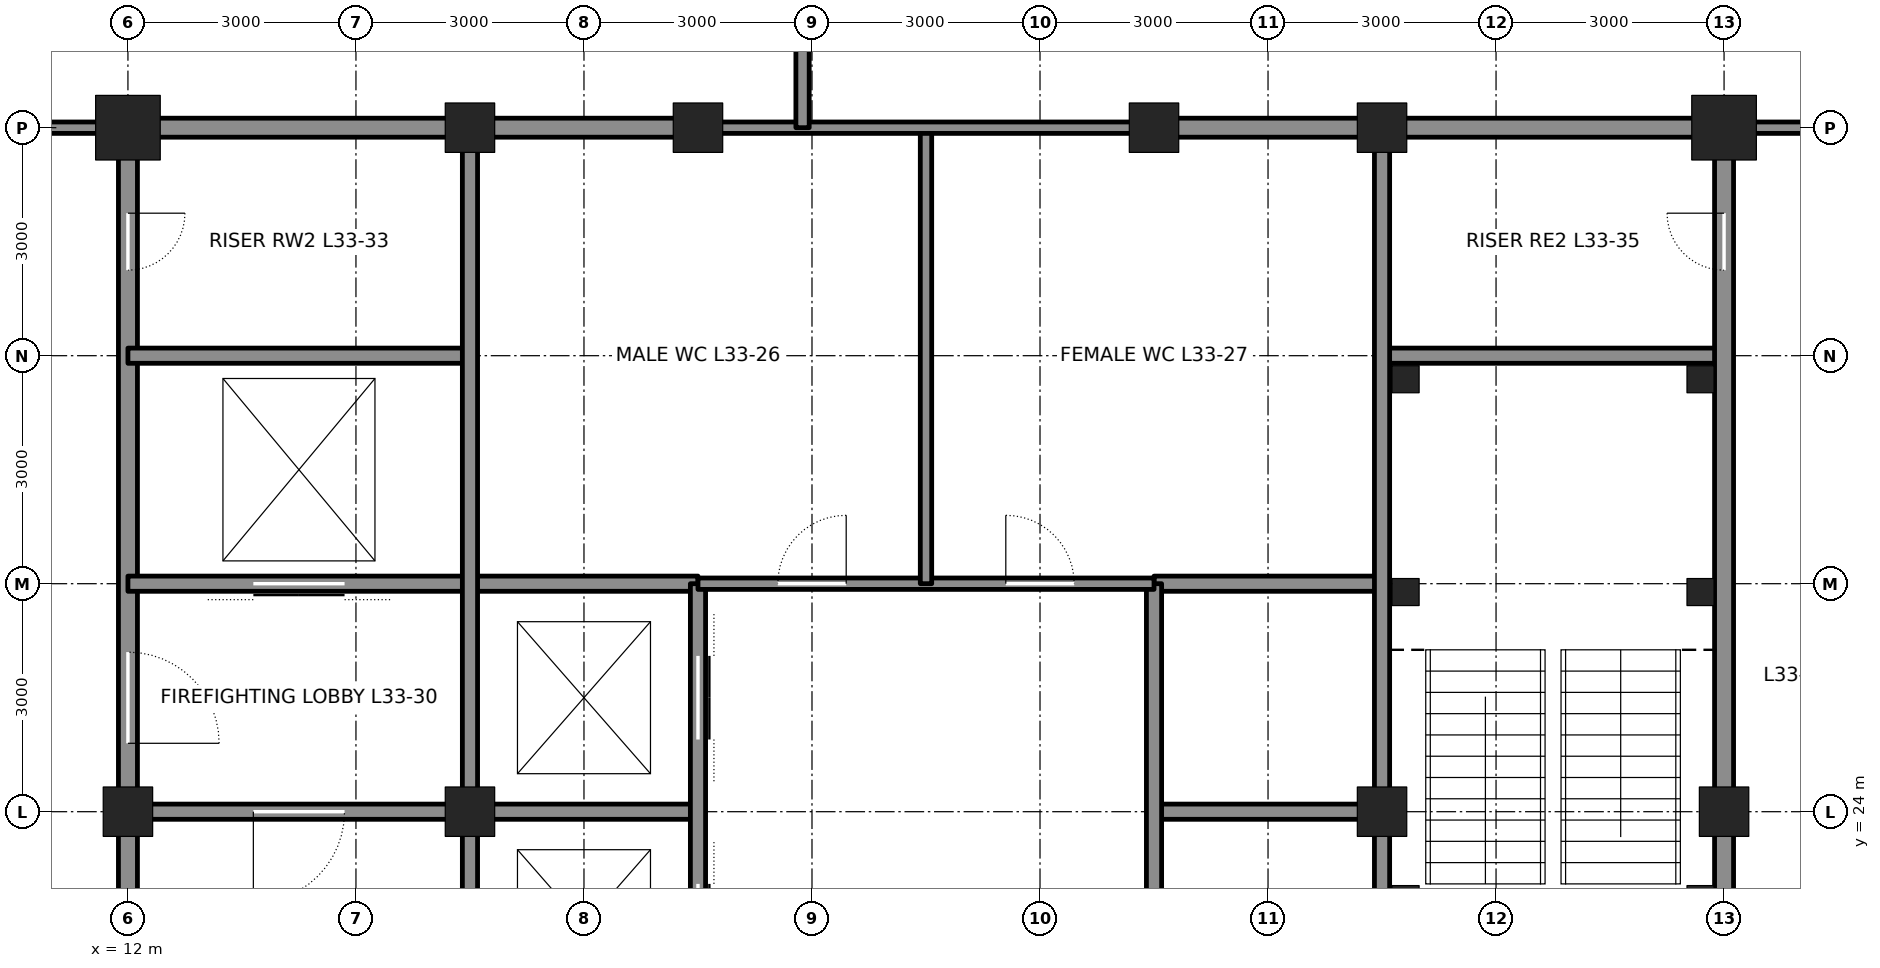
"""IFC4 building model, lengths in metres.
Left out: names, types, materials, properties, quantities, classifications, styles, units other than length and angle.
Written with IfcOpenShell. Run it as: python <this file> out.ifc"""

import sys

from ifc_helpers import new_model, si_unit, direction, frame, frame_2d, origin, origin_2d, place, context, subcontext, project, spatial, rectangle, hollow_rectangle, extrude, element, fill, save


model = new_model("IFC4")
c1 = context("Model", 3, precision=1e-05, world=origin(), true_north=direction((0.0, 1.0)))
c2 = subcontext(c1, "Body", "Model", "MODEL_VIEW")
j1 = project(units=[si_unit("LENGTHUNIT", "METRE"), si_unit("PLANEANGLEUNIT", "RADIAN")], contexts=[c1])
p1 = place(None, origin())
s1 = spatial("IfcSite", under=j1, at=p1, CompositionType="ELEMENT")
p2 = place(p1, origin())
s2 = spatial("IfcBuilding", under=s1, at=p2, CompositionType="ELEMENT")
p3 = place(p2, frame((0.0, 0.0, 153.0)))
s3 = spatial("IfcBuildingStorey", under=s2, at=p3, CompositionType="ELEMENT", Elevation=153.0)
p4 = place(p3, frame((12.0, 33.0, 0.0), z_axis=(0.0, 0.0, 1.0), x_axis=(1.0, 0.0, 0.0)))
e1 = element("IfcColumn", 1, at=p4, inside=s3, PredefinedType="COLUMN", context=c2, shape_type="SweptSolid", body=[
    extrude(hollow_rectangle(XDim=0.85, YDim=0.85, WallThickness=0.085, at=origin_2d()), origin(), (0.0, 0.0, 1.0), 4.2),
])
for number, where, z_axis, x_axis in (
    (2, (16.5, 33.0, 0.0), (0.0, 0.0, 1.0), (1.0, 0.0, 0.0)),
    (3, (19.5, 33.0, 0.0), (0.0, 0.0, 1.0), (1.0, 0.0, 0.0)),
    (4, (25.5, 33.0, 0.0), (0.0, 0.0, 1.0), (1.0, 0.0, 0.0)),
    (5, (28.5, 33.0, 0.0), (0.0, 0.0, 1.0), (1.0, 0.0, 0.0)),
):
    element("IfcColumn", number, at=place(p3, frame(where, z_axis=z_axis, x_axis=x_axis)), inside=s3, PredefinedType="COLUMN", context=c2, shape_type="SweptSolid", body=[
        extrude(hollow_rectangle(XDim=0.65, YDim=0.65, WallThickness=0.065, at=origin_2d()), origin(), (0.0, 0.0, 1.0), 4.2),
    ])
p5 = place(p3, frame((33.0, 33.0, 0.0), z_axis=(0.0, 0.0, 1.0), x_axis=(1.0, 0.0, 0.0)))
e6 = element("IfcColumn", 6, at=p5, inside=s3, PredefinedType="COLUMN", context=c2, shape_type="SweptSolid", body=[
    extrude(hollow_rectangle(XDim=0.85, YDim=0.85, WallThickness=0.085, at=origin_2d()), origin(), (0.0, 0.0, 1.0), 4.2),
])
for number, where, z_axis, x_axis in (
    (7, (12.0, 24.0, 0.0), (0.0, 0.0, 1.0), (1.0, 0.0, 0.0)),
    (8, (33.0, 24.0, 0.0), (0.0, 0.0, 1.0), (1.0, 0.0, 0.0)),
    (9, (16.5, 24.0, 0.0), (0.0, 0.0, 1.0), (1.0, 0.0, 0.0)),
    (10, (28.5, 24.0, 0.0), (0.0, 0.0, 1.0), (1.0, 0.0, 0.0)),
):
    element("IfcColumn", number, at=place(p3, frame(where, z_axis=z_axis, x_axis=x_axis)), inside=s3, PredefinedType="COLUMN", context=c2, shape_type="SweptSolid", body=[
        extrude(hollow_rectangle(XDim=0.65, YDim=0.65, WallThickness=0.065, at=origin_2d()), origin(), (0.0, 0.0, 1.0), 4.2),
    ])
p6 = place(p3, frame((12.0, 21.25, 0.0), z_axis=(0.0, 0.0, 1.0), x_axis=(0.0, 1.0, 0.0)))
e11 = element("IfcWall", 11, at=p6, inside=s3, PredefinedType="SOLIDWALL", context=c2, shape_type="SweptSolid", body=[
    extrude(rectangle(XDim=2.5, YDim=0.25, at=frame_2d((1.25, 0.0))), origin(), (0.0, 0.0, 1.0), 3.113),
])
p7 = place(p3, frame((12.0, 24.25, 0.0), z_axis=(0.0, 0.0, 1.0), x_axis=(0.0, 1.0, 0.0)))
e12 = element("IfcWall", 12, at=p7, inside=s3, PredefinedType="SOLIDWALL", context=c2, shape_type="SweptSolid", body=[
    extrude(rectangle(XDim=8.5, YDim=0.25, at=frame_2d((4.25, 0.0))), origin(), (0.0, 0.0, 1.0), 3.113),
])
p8 = place(p7, frame((0.65, 0.0, 0.0)))
e13 = element("IfcOpeningElement", 13, at=p8, cuts=e12, PredefinedType="OPENING", context=c2, shape_type="SweptSolid", body=[
    extrude(rectangle(XDim=1.2, YDim=2.1, at=frame_2d((0.6, 1.05))), frame((0.0, 0.135, 0.0), z_axis=(0.0, -1.0, 0.0), x_axis=(1.0, 0.0, 0.0)), (0.0, 0.0, 1.0), 0.27),
])
p9 = place(p7, frame((6.875, 0.0, 0.0)))
e14 = element("IfcOpeningElement", 14, at=p9, cuts=e12, PredefinedType="OPENING", context=c2, shape_type="SweptSolid", body=[
    extrude(rectangle(XDim=0.75, YDim=2.1, at=frame_2d((0.375, 1.05))), frame((0.0, 0.135, 0.0), z_axis=(0.0, -1.0, 0.0), x_axis=(1.0, 0.0, 0.0)), (0.0, 0.0, 1.0), 0.27),
])
p10 = place(p3, frame((12.25, 24.0, 0.0), z_axis=(0.0, 0.0, 1.0), x_axis=(1.0, 0.0, 0.0)))
e15 = element("IfcWall", 15, at=p10, inside=s3, PredefinedType="SOLIDWALL", context=c2, shape_type="SweptSolid", body=[
    extrude(rectangle(XDim=4.0, YDim=0.2, at=frame_2d((2.0, 0.0))), origin(), (0.0, 0.0, 1.0), 3.09),
])
p11 = place(p10, frame((1.4, 0.0, 0.0)))
e16 = element("IfcOpeningElement", 16, at=p11, cuts=e15, PredefinedType="OPENING", context=c2, shape_type="SweptSolid", body=[
    extrude(rectangle(XDim=1.2, YDim=2.1, at=frame_2d((0.6, 1.05))), frame((0.0, 0.11, 0.0), z_axis=(0.0, -1.0, 0.0), x_axis=(1.0, 0.0, 0.0)), (0.0, 0.0, 1.0), 0.22),
])
for number, where, z_axis, x_axis in (
    (17, (16.75, 24.0, 0.0), (0.0, 0.0, 1.0), (1.0, 0.0, 0.0)),
    (18, (25.5, 24.0, 0.0), (0.0, 0.0, 1.0), (1.0, 0.0, 0.0)),
):
    element("IfcWall", number, at=place(p3, frame(where, z_axis=z_axis, x_axis=x_axis)), inside=s3, PredefinedType="SOLIDWALL", context=c2, shape_type="SweptSolid", body=[
        extrude(rectangle(XDim=2.75, YDim=0.2, at=frame_2d((1.375, 0.0))), origin(), (0.0, 0.0, 1.0), 3.09),
    ])
p12 = place(p3, frame((12.0, 27.0, 0.0), z_axis=(0.0, 0.0, 1.0), x_axis=(1.0, 0.0, 0.0)))
e19 = element("IfcWall", 19, at=p12, inside=s3, PredefinedType="SOLIDWALL", context=c2, shape_type="SweptSolid", body=[
    extrude(rectangle(XDim=7.5, YDim=0.2, at=frame_2d((3.75, 0.0))), origin(), (0.0, 0.0, 1.0), 4.04),
])
p13 = place(p12, frame((1.65, 0.0, 0.0)))
e20 = element("IfcOpeningElement", 20, at=p13, cuts=e19, PredefinedType="OPENING", context=c2, shape_type="SweptSolid", body=[
    extrude(rectangle(XDim=1.2, YDim=2.1, at=frame_2d((0.6, 1.05))), frame((0.0, 0.11, 0.0), z_axis=(0.0, -1.0, 0.0), x_axis=(1.0, 0.0, 0.0)), (0.0, 0.0, 1.0), 0.22),
])
p14 = place(p3, frame((25.5, 27.0, 0.0), z_axis=(0.0, 0.0, 1.0), x_axis=(1.0, 0.0, 0.0)))
e21 = element("IfcWall", 21, at=p14, inside=s3, PredefinedType="SOLIDWALL", context=c2, shape_type="SweptSolid", body=[
    extrude(rectangle(XDim=3.0, YDim=0.2, at=frame_2d((1.5, 0.0))), origin(), (0.0, 0.0, 1.0), 4.04),
])
for number, where, z_axis, x_axis in (
    (22, (12.0, 30.0, 0.0), (0.0, 0.0, 1.0), (1.0, 0.0, 0.0)),
    (23, (28.5, 30.0, 0.0), (0.0, 0.0, 1.0), (1.0, 0.0, 0.0)),
):
    element("IfcWall", number, at=place(p3, frame(where, z_axis=z_axis, x_axis=x_axis)), inside=s3, PredefinedType="SOLIDWALL", context=c2, shape_type="SweptSolid", body=[
        extrude(rectangle(XDim=4.5, YDim=0.2, at=frame_2d((2.25, 0.0))), origin(), (0.0, 0.0, 1.0), 4.04),
    ])
p15 = place(p3, frame((12.25, 33.0, 0.0), z_axis=(0.0, 0.0, 1.0), x_axis=(1.0, 0.0, 0.0)))
e24 = element("IfcWall", 24, at=p15, inside=s3, PredefinedType="SOLIDWALL", context=c2, shape_type="SweptSolid", body=[
    extrude(rectangle(XDim=4.0, YDim=0.25, at=frame_2d((2.0, 0.0))), origin(), (0.0, 0.0, 1.0), 3.181),
])
for number, where, z_axis, x_axis in (
    (25, (16.75, 33.0, 0.0), (0.0, 0.0, 1.0), (1.0, 0.0, 0.0)),
    (26, (25.75, 33.0, 0.0), (0.0, 0.0, 1.0), (1.0, 0.0, 0.0)),
):
    element("IfcWall", number, at=place(p3, frame(where, z_axis=z_axis, x_axis=x_axis)), inside=s3, PredefinedType="SOLIDWALL", context=c2, shape_type="SweptSolid", body=[
        extrude(rectangle(XDim=2.5, YDim=0.25, at=frame_2d((1.25, 0.0))), origin(), (0.0, 0.0, 1.0), 3.181),
    ])
p16 = place(p3, frame((28.75, 33.0, 0.0), z_axis=(0.0, 0.0, 1.0), x_axis=(1.0, 0.0, 0.0)))
e27 = element("IfcWall", 27, at=p16, inside=s3, PredefinedType="SOLIDWALL", context=c2, shape_type="SweptSolid", body=[
    extrude(rectangle(XDim=4.0, YDim=0.25, at=frame_2d((2.0, 0.0))), origin(), (0.0, 0.0, 1.0), 3.181),
])
p17 = place(p3, frame((16.5, 21.25, 0.0), z_axis=(0.0, 0.0, 1.0), x_axis=(0.0, 1.0, 0.0)))
e28 = element("IfcWall", 28, at=p17, inside=s3, PredefinedType="SOLIDWALL", context=c2, shape_type="SweptSolid", body=[
    extrude(rectangle(XDim=2.5, YDim=0.2, at=frame_2d((1.25, 0.0))), origin(), (0.0, 0.0, 1.0), 3.113),
])
p18 = place(p3, frame((16.5, 24.25, 0.0), z_axis=(0.0, 0.0, 1.0), x_axis=(0.0, 1.0, 0.0)))
e29 = element("IfcWall", 29, at=p18, inside=s3, PredefinedType="SOLIDWALL", context=c2, shape_type="SweptSolid", body=[
    extrude(rectangle(XDim=8.5, YDim=0.2, at=frame_2d((4.25, 0.0))), origin(), (0.0, 0.0, 1.0), 3.113),
])
p19 = place(p3, frame((19.5, 15.0, 0.0), z_axis=(0.0, 0.0, 1.0), x_axis=(0.0, 1.0, 0.0)))
e30 = element("IfcWall", 30, at=p19, inside=s3, PredefinedType="SOLIDWALL", context=c2, shape_type="SweptSolid", body=[
    extrude(rectangle(XDim=12.0, YDim=0.2, at=frame_2d((6.0, 0.0))), origin(), (0.0, 0.0, 1.0), 3.065),
])
p20 = place(p19, frame((0.95, 0.0, 0.0)))
e31 = element("IfcOpeningElement", 31, at=p20, cuts=e30, PredefinedType="OPENING", context=c2, shape_type="SweptSolid", body=[
    extrude(rectangle(XDim=1.1, YDim=2.1, at=frame_2d((0.55, 1.05))), frame((0.0, 0.11, 0.0), z_axis=(0.0, -1.0, 0.0), x_axis=(1.0, 0.0, 0.0)), (0.0, 0.0, 1.0), 0.22),
])
p21 = place(p19, frame((3.95, 0.0, 0.0)))
e32 = element("IfcOpeningElement", 32, at=p21, cuts=e30, PredefinedType="OPENING", context=c2, shape_type="SweptSolid", body=[
    extrude(rectangle(XDim=1.1, YDim=2.1, at=frame_2d((0.55, 1.05))), frame((0.0, 0.11, 0.0), z_axis=(0.0, -1.0, 0.0), x_axis=(1.0, 0.0, 0.0)), (0.0, 0.0, 1.0), 0.22),
])
p22 = place(p19, frame((6.95, 0.0, 0.0)))
e33 = element("IfcOpeningElement", 33, at=p22, cuts=e30, PredefinedType="OPENING", context=c2, shape_type="SweptSolid", body=[
    extrude(rectangle(XDim=1.1, YDim=2.1, at=frame_2d((0.55, 1.05))), frame((0.0, 0.11, 0.0), z_axis=(0.0, -1.0, 0.0), x_axis=(1.0, 0.0, 0.0)), (0.0, 0.0, 1.0), 0.22),
])
p23 = place(p19, frame((9.95, 0.0, 0.0)))
e34 = element("IfcOpeningElement", 34, at=p23, cuts=e30, PredefinedType="OPENING", context=c2, shape_type="SweptSolid", body=[
    extrude(rectangle(XDim=1.1, YDim=2.1, at=frame_2d((0.55, 1.05))), frame((0.0, 0.11, 0.0), z_axis=(0.0, -1.0, 0.0), x_axis=(1.0, 0.0, 0.0)), (0.0, 0.0, 1.0), 0.22),
])
p24 = place(p3, frame((25.5, 15.0, 0.0), z_axis=(0.0, 0.0, 1.0), x_axis=(0.0, 1.0, 0.0)))
e35 = element("IfcWall", 35, at=p24, inside=s3, PredefinedType="SOLIDWALL", context=c2, shape_type="SweptSolid", body=[
    extrude(rectangle(XDim=12.0, YDim=0.2, at=frame_2d((6.0, 0.0))), origin(), (0.0, 0.0, 1.0), 3.065),
])
p25 = place(p3, frame((28.5, 21.25, 0.0), z_axis=(0.0, 0.0, 1.0), x_axis=(0.0, 1.0, 0.0)))
e36 = element("IfcWall", 36, at=p25, inside=s3, PredefinedType="SOLIDWALL", context=c2, shape_type="SweptSolid", body=[
    extrude(rectangle(XDim=2.5, YDim=0.2, at=frame_2d((1.25, 0.0))), origin(), (0.0, 0.0, 1.0), 3.113),
])
p26 = place(p3, frame((28.5, 24.25, 0.0), z_axis=(0.0, 0.0, 1.0), x_axis=(0.0, 1.0, 0.0)))
e37 = element("IfcWall", 37, at=p26, inside=s3, PredefinedType="SOLIDWALL", context=c2, shape_type="SweptSolid", body=[
    extrude(rectangle(XDim=8.5, YDim=0.2, at=frame_2d((4.25, 0.0))), origin(), (0.0, 0.0, 1.0), 3.113),
])
p27 = place(p3, frame((33.0, 21.25, 0.0), z_axis=(0.0, 0.0, 1.0), x_axis=(0.0, 1.0, 0.0)))
e38 = element("IfcWall", 38, at=p27, inside=s3, PredefinedType="SOLIDWALL", context=c2, shape_type="SweptSolid", body=[
    extrude(rectangle(XDim=2.5, YDim=0.25, at=frame_2d((1.25, 0.0))), origin(), (0.0, 0.0, 1.0), 3.113),
])
p28 = place(p3, frame((33.0, 24.25, 0.0), z_axis=(0.0, 0.0, 1.0), x_axis=(0.0, 1.0, 0.0)))
e39 = element("IfcWall", 39, at=p28, inside=s3, PredefinedType="SOLIDWALL", context=c2, shape_type="SweptSolid", body=[
    extrude(rectangle(XDim=8.5, YDim=0.25, at=frame_2d((4.25, 0.0))), origin(), (0.0, 0.0, 1.0), 3.113),
])
p29 = place(p28, frame((6.875, 0.0, 0.0)))
e40 = element("IfcOpeningElement", 40, at=p29, cuts=e39, PredefinedType="OPENING", context=c2, shape_type="SweptSolid", body=[
    extrude(rectangle(XDim=0.75, YDim=2.1, at=frame_2d((0.375, 1.05))), frame((0.0, 0.135, 0.0), z_axis=(0.0, -1.0, 0.0), x_axis=(1.0, 0.0, 0.0)), (0.0, 0.0, 1.0), 0.27),
])
p30 = place(p3, frame((19.5, 27.0, 0.0), z_axis=(0.0, 0.0, 1.0), x_axis=(1.0, 0.0, 0.0)))
e41 = element("IfcWall", 41, at=p30, inside=s3, PredefinedType="PARTITIONING", context=c2, shape_type="SweptSolid", body=[
    extrude(rectangle(XDim=6.0, YDim=0.15, at=frame_2d((3.0, 0.0))), origin(), (0.0, 0.0, 1.0), 4.04),
])
p31 = place(p30, frame((1.05, 0.0, 0.0)))
e42 = element("IfcOpeningElement", 42, at=p31, cuts=e41, PredefinedType="OPENING", context=c2, shape_type="SweptSolid", body=[
    extrude(rectangle(XDim=0.9, YDim=2.1, at=frame_2d((0.45, 1.05))), frame((0.0, 0.085, 0.0), z_axis=(0.0, -1.0, 0.0), x_axis=(1.0, 0.0, 0.0)), (0.0, 0.0, 1.0), 0.17),
])
p32 = place(p30, frame((4.05, 0.0, 0.0)))
e43 = element("IfcOpeningElement", 43, at=p32, cuts=e41, PredefinedType="OPENING", context=c2, shape_type="SweptSolid", body=[
    extrude(rectangle(XDim=0.9, YDim=2.1, at=frame_2d((0.45, 1.05))), frame((0.0, 0.085, 0.0), z_axis=(0.0, -1.0, 0.0), x_axis=(1.0, 0.0, 0.0)), (0.0, 0.0, 1.0), 0.17),
])
p33 = place(p3, frame((22.5, 27.0, 0.0), z_axis=(0.0, 0.0, 1.0), x_axis=(0.0, 1.0, 0.0)))
e44 = element("IfcWall", 44, at=p33, inside=s3, PredefinedType="PARTITIONING", context=c2, shape_type="SweptSolid", body=[
    extrude(rectangle(XDim=6.0, YDim=0.15, at=frame_2d((3.0, 0.0))), origin(), (0.0, 0.0, 1.0), 4.04),
])
p34 = place(p3, frame((19.5, 33.0, 0.0), z_axis=(0.0, 0.0, 1.0), x_axis=(1.0, 0.0, 0.0)))
e45 = element("IfcWall", 45, at=p34, inside=s3, PredefinedType="PARTITIONING", context=c2, shape_type="SweptSolid", body=[
    extrude(rectangle(XDim=6.0, YDim=0.15, at=frame_2d((3.0, 0.0))), origin(), (0.0, 0.0, 1.0), 3.181),
])
for number, where, z_axis, x_axis in (
    (46, (10.2, 33.0, 0.0), (0.0, 0.0, 1.0), (1.0, 0.0, 0.0)),
    (47, (33.0, 33.0, 0.0), (0.0, 0.0, 1.0), (1.0, 0.0, 0.0)),
):
    element("IfcWall", number, at=place(p3, frame(where, z_axis=z_axis, x_axis=x_axis)), inside=s3, PredefinedType="PARTITIONING", context=c2, shape_type="SweptSolid", body=[
        extrude(rectangle(XDim=1.8, YDim=0.15, at=frame_2d((0.9, 0.0))), origin(), (0.0, 0.0, 1.0), 3.271),
    ])
p35 = place(p3, frame((20.876, 44.347, 0.0), z_axis=(0.0, 0.0, 1.0), x_axis=(0.0, -1.0, 0.0)))
e48 = element("IfcWall", 48, at=p35, inside=s3, PredefinedType="PARTITIONING", context=c2, shape_type="SweptSolid", body=[
    extrude(rectangle(XDim=11.347, YDim=0.175, at=frame_2d((5.674, 0.0))), origin(), (0.0, 0.0, 1.0), 3.357),
])
for number, where, z_axis, x_axis in (
    (49, (28.81, 29.69, 0.0), (0.0, 0.0, 1.0), (1.0, 0.0, 0.0)),
    (50, (32.69, 29.69, 0.0), (0.0, 0.0, 1.0), (1.0, 0.0, 0.0)),
    (51, (28.81, 26.89, 0.0), (0.0, 0.0, 1.0), (1.0, 0.0, 0.0)),
    (52, (32.69, 26.89, 0.0), (0.0, 0.0, 1.0), (1.0, 0.0, 0.0)),
    (53, (28.81, 22.85, 0.0), (0.0, 0.0, 1.0), (1.0, 0.0, 0.0)),
    (54, (32.69, 22.85, 0.0), (0.0, 0.0, 1.0), (1.0, 0.0, 0.0)),
):
    element("IfcColumn", number, at=place(p3, frame(where, z_axis=z_axis, x_axis=x_axis)), inside=s3, PredefinedType="COLUMN", context=c2, shape_type="SweptSolid", body=[
        extrude(hollow_rectangle(XDim=0.356, YDim=0.356, WallThickness=0.015, at=origin_2d()), origin(), (0.0, 0.0, 1.0), 4.2),
    ])
p36 = place(p11, frame((1.2, 0.0, 0.0), z_axis=(0.0, 0.0, 1.0), x_axis=(-1.0, 0.0, 0.0)))
e55 = element("IfcDoor", 55, at=p36, inside=s3, OperationType="SINGLE_SWING_RIGHT", PredefinedType="DOOR", context=c2, shape_type="SweptSolid", body=[
    extrude(rectangle(XDim=1.2, YDim=2.1, at=frame_2d((0.6, 1.05))), frame((0.0, 0.025, 0.0), z_axis=(0.0, -1.0, 0.0), x_axis=(1.0, 0.0, 0.0)), (0.0, 0.0, 1.0), 0.05),
])
fill(e16, e55)
p37 = place(p8, frame((1.2, 0.0, 0.0), z_axis=(0.0, 0.0, 1.0), x_axis=(-1.0, 0.0, 0.0)))
e56 = element("IfcDoor", 56, at=p37, inside=s3, OperationType="SINGLE_SWING_RIGHT", PredefinedType="DOOR", context=c2, shape_type="SweptSolid", body=[
    extrude(rectangle(XDim=1.2, YDim=2.1, at=frame_2d((0.6, 1.05))), frame((0.0, 0.025, 0.0), z_axis=(0.0, -1.0, 0.0), x_axis=(1.0, 0.0, 0.0)), (0.0, 0.0, 1.0), 0.05),
])
fill(e13, e56)
p38 = place(p13, origin())
e57 = element("IfcDoor", 57, at=p38, inside=s3, OperationType="DOUBLE_DOOR_SLIDING", PredefinedType="DOOR", context=c2, shape_type="SweptSolid", body=[
    extrude(rectangle(XDim=1.2, YDim=2.1, at=frame_2d((0.6, 1.05))), frame((0.0, 0.025, 0.0), z_axis=(0.0, -1.0, 0.0), x_axis=(1.0, 0.0, 0.0)), (0.0, 0.0, 1.0), 0.05),
])
fill(e20, e57)
p39 = place(p9, frame((0.75, 0.0, 0.0), z_axis=(0.0, 0.0, 1.0), x_axis=(-1.0, 0.0, 0.0)))
e58 = element("IfcDoor", 58, at=p39, inside=s3, OperationType="SINGLE_SWING_LEFT", PredefinedType="DOOR", context=c2, shape_type="SweptSolid", body=[
    extrude(rectangle(XDim=0.75, YDim=2.1, at=frame_2d((0.375, 1.05))), frame((0.0, 0.025, 0.0), z_axis=(0.0, -1.0, 0.0), x_axis=(1.0, 0.0, 0.0)), (0.0, 0.0, 1.0), 0.05),
])
fill(e14, e58)
p40 = place(p29, origin())
e59 = element("IfcDoor", 59, at=p40, inside=s3, OperationType="SINGLE_SWING_RIGHT", PredefinedType="DOOR", context=c2, shape_type="SweptSolid", body=[
    extrude(rectangle(XDim=0.75, YDim=2.1, at=frame_2d((0.375, 1.05))), frame((0.0, 0.025, 0.0), z_axis=(0.0, -1.0, 0.0), x_axis=(1.0, 0.0, 0.0)), (0.0, 0.0, 1.0), 0.05),
])
fill(e40, e59)
p41 = place(p31, origin())
e60 = element("IfcDoor", 60, at=p41, inside=s3, OperationType="SINGLE_SWING_RIGHT", PredefinedType="DOOR", context=c2, shape_type="SweptSolid", body=[
    extrude(rectangle(XDim=0.9, YDim=2.1, at=frame_2d((0.45, 1.05))), frame((0.0, 0.025, 0.0), z_axis=(0.0, -1.0, 0.0), x_axis=(1.0, 0.0, 0.0)), (0.0, 0.0, 1.0), 0.05),
])
fill(e42, e60)
p42 = place(p32, origin())
e61 = element("IfcDoor", 61, at=p42, inside=s3, OperationType="SINGLE_SWING_LEFT", PredefinedType="DOOR", context=c2, shape_type="SweptSolid", body=[
    extrude(rectangle(XDim=0.9, YDim=2.1, at=frame_2d((0.45, 1.05))), frame((0.0, 0.025, 0.0), z_axis=(0.0, -1.0, 0.0), x_axis=(1.0, 0.0, 0.0)), (0.0, 0.0, 1.0), 0.05),
])
fill(e43, e61)
p43 = place(p22, origin())
e62 = element("IfcDoor", 62, at=p43, inside=s3, OperationType="DOUBLE_DOOR_SLIDING", PredefinedType="DOOR", context=c2, shape_type="SweptSolid", body=[
    extrude(rectangle(XDim=1.1, YDim=2.1, at=frame_2d((0.55, 1.05))), frame((0.0, 0.025, 0.0), z_axis=(0.0, -1.0, 0.0), x_axis=(1.0, 0.0, 0.0)), (0.0, 0.0, 1.0), 0.05),
])
fill(e33, e62)
p44 = place(p23, origin())
e63 = element("IfcDoor", 63, at=p44, inside=s3, OperationType="DOUBLE_DOOR_SLIDING", PredefinedType="DOOR", context=c2, shape_type="SweptSolid", body=[
    extrude(rectangle(XDim=1.1, YDim=2.1, at=frame_2d((0.55, 1.05))), frame((0.0, 0.025, 0.0), z_axis=(0.0, -1.0, 0.0), x_axis=(1.0, 0.0, 0.0)), (0.0, 0.0, 1.0), 0.05),
])
fill(e34, e63)
save(model, sys.argv[1])
